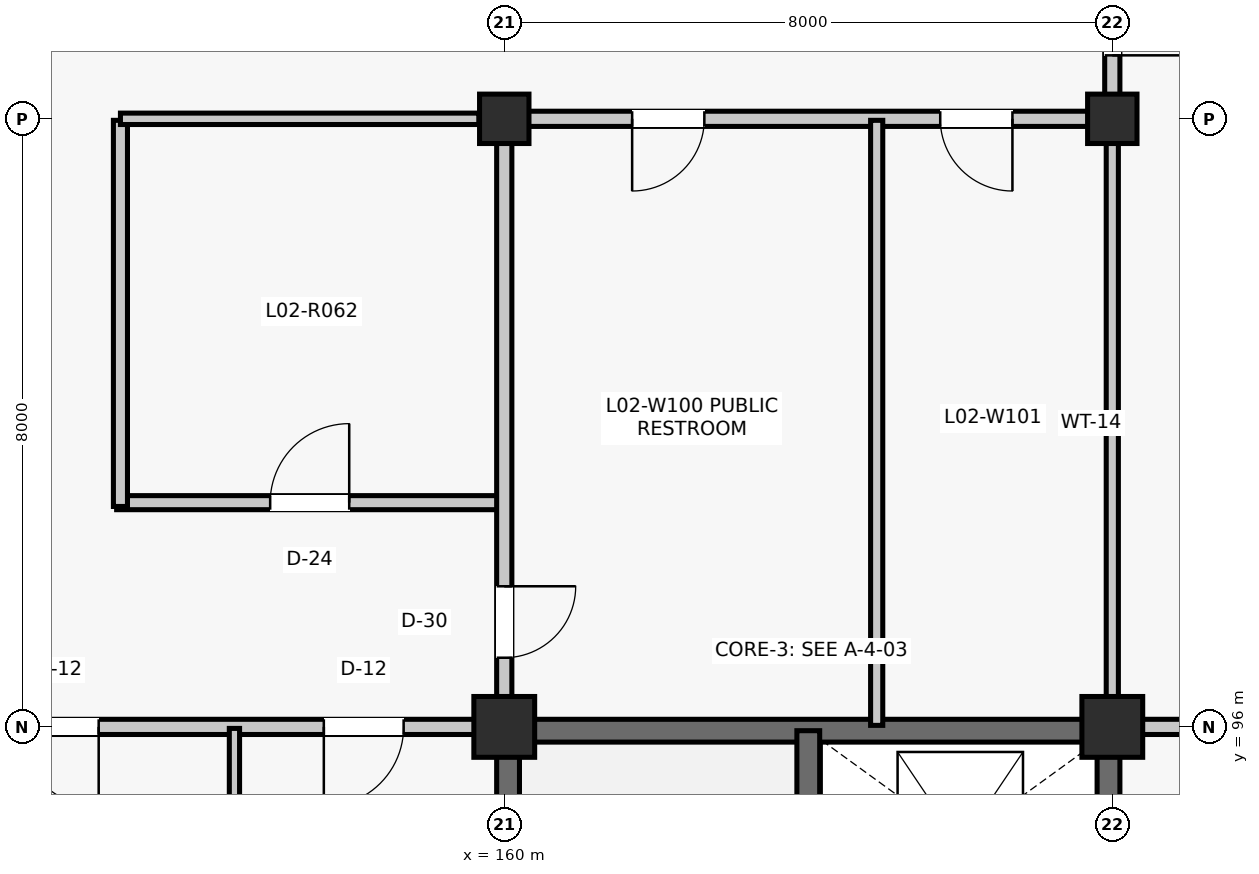
"""IFC4 building model, lengths in metres.
Left out: names, types, materials, properties, quantities, classifications, styles, units other than length and angle.
Written with IfcOpenShell. Run it as: python <this file> out.ifc"""

import sys

from ifc_helpers import new_model, si_unit, direction, frame, frame_2d, origin, origin_2d, place, context, subcontext, project, spatial, rectangle, extrude, element, fill, save


model = new_model("IFC4")
c1 = context("Model", 3, precision=1e-05, world=origin(), true_north=direction((0.0, 1.0)))
c2 = subcontext(c1, "Body", "Model", "MODEL_VIEW")
j1 = project(units=[si_unit("LENGTHUNIT", "METRE"), si_unit("PLANEANGLEUNIT", "RADIAN")], contexts=[c1])
p1 = place(None, origin())
s1 = spatial("IfcSite", under=j1, at=p1, CompositionType="ELEMENT")
p2 = place(p1, origin())
s2 = spatial("IfcBuilding", under=s1, at=p2, CompositionType="ELEMENT")
p3 = place(p2, frame((0.0, 0.0, 9.9)))
s3 = spatial("IfcBuildingStorey", under=s2, at=p3, CompositionType="ELEMENT", Elevation=9.9)
p4 = place(p3, frame((160.0, 96.0, 0.0), z_axis=(0.0, 0.0, 1.0), x_axis=(1.0, 0.0, 0.0)))
e1 = element("IfcColumn", 1, at=p4, inside=s3, PredefinedType="COLUMN", context=c2, shape_type="SweptSolid", body=[
    extrude(rectangle(XDim=0.8, YDim=0.8, at=origin_2d()), origin(), (0.0, 0.0, 1.0), 3.96),
])
p5 = place(p3, frame((160.0, 104.0, 0.0), z_axis=(0.0, 0.0, 1.0), x_axis=(1.0, 0.0, 0.0)))
e2 = element("IfcColumn", 2, at=p5, inside=s3, PredefinedType="COLUMN", context=c2, shape_type="SweptSolid", body=[
    extrude(rectangle(XDim=0.65, YDim=0.65, at=origin_2d()), origin(), (0.0, 0.0, 1.0), 3.96),
])
p6 = place(p3, frame((168.0, 96.0, 0.0), z_axis=(0.0, 0.0, 1.0), x_axis=(1.0, 0.0, 0.0)))
e3 = element("IfcColumn", 3, at=p6, inside=s3, PredefinedType="COLUMN", context=c2, shape_type="SweptSolid", body=[
    extrude(rectangle(XDim=0.8, YDim=0.8, at=origin_2d()), origin(), (0.0, 0.0, 1.0), 3.96),
])
p7 = place(p3, frame((168.0, 104.0, 0.0), z_axis=(0.0, 0.0, 1.0), x_axis=(1.0, 0.0, 0.0)))
e4 = element("IfcColumn", 4, at=p7, inside=s3, PredefinedType="COLUMN", context=c2, shape_type="SweptSolid", body=[
    extrude(rectangle(XDim=0.65, YDim=0.65, at=origin_2d()), origin(), (0.0, 0.0, 1.0), 3.96),
])
for number, where, z_axis, x_axis in (
    (5, (160.05, 88.29, 0.0), (0.0, 0.0, 1.0), (0.0, 1.0, 0.0)),
    (6, (160.29, 95.95, 0.0), (0.0, 0.0, 1.0), (1.0, 0.0, 0.0)),
):
    element("IfcWall", number, at=place(p3, frame(where, z_axis=z_axis, x_axis=x_axis)), inside=s3, PredefinedType="SHEAR", context=c2, shape_type="SweptSolid", body=[
        extrude(rectangle(XDim=7.42, YDim=0.3, at=frame_2d((3.71, 0.0))), origin(), (0.0, 0.0, 1.0), 3.705),
    ])
p8 = place(p3, frame((167.95, 88.29, 0.0), z_axis=(0.0, 0.0, 1.0), x_axis=(0.0, 1.0, 0.0)))
e7 = element("IfcWall", 7, at=p8, inside=s3, PredefinedType="SHEAR", context=c2, shape_type="SweptSolid", body=[
    extrude(rectangle(XDim=7.42, YDim=0.3, at=frame_2d((3.71, 0.0))), origin(), (0.0, 0.0, 1.0), 3.705),
])
p9 = place(p8, frame((1.6, 0.0, 0.0)))
e8 = element("IfcOpeningElement", 8, at=p9, cuts=e7, PredefinedType="OPENING", context=c2, shape_type="SweptSolid", body=[
    extrude(rectangle(XDim=1.2, YDim=2.15, at=frame_2d((0.6, 1.075))), frame((0.0, 0.16, 0.0), z_axis=(0.0, -1.0, 0.0), x_axis=(1.0, 0.0, 0.0)), (0.0, 0.0, 1.0), 0.32),
])
p10 = place(p3, frame((164.0, 88.05, 0.0), z_axis=(0.0, 0.0, 1.0), x_axis=(0.0, 1.0, 0.0)))
e9 = element("IfcWall", 9, at=p10, inside=s3, PredefinedType="SHEAR", context=c2, shape_type="SweptSolid", body=[
    extrude(rectangle(XDim=7.9, YDim=0.3, at=frame_2d((3.95, 0.0))), origin(), (0.0, 0.0, 1.0), 3.705),
])
p11 = place(p10, frame((0.55, 0.0, 0.0)))
e10 = element("IfcOpeningElement", 10, at=p11, cuts=e9, PredefinedType="OPENING", context=c2, shape_type="SweptSolid", body=[
    extrude(rectangle(XDim=1.1, YDim=2.15, at=frame_2d((0.55, 1.075))), frame((0.0, 0.16, 0.0), z_axis=(0.0, -1.0, 0.0), x_axis=(1.0, 0.0, 0.0)), (0.0, 0.0, 1.0), 0.32),
])
p12 = place(p3, frame((154.9, 98.95, 0.0), z_axis=(0.0, 0.0, 1.0), x_axis=(1.0, 0.0, 0.0)))
e11 = element("IfcWall", 11, at=p12, inside=s3, PredefinedType="PARTITIONING", context=c2, shape_type="SweptSolid", body=[
    extrude(rectangle(XDim=5.08, YDim=0.185, at=frame_2d((2.54, 0.0))), origin(), (0.0, 0.0, 1.0), 3.157),
])
p13 = place(p12, frame((2.02, 0.0, 0.0)))
e12 = element("IfcOpeningElement", 12, at=p13, cuts=e11, PredefinedType="OPENING", context=c2, shape_type="SweptSolid", body=[
    extrude(rectangle(XDim=1.04, YDim=2.18, at=frame_2d((0.52, 1.09))), frame((0.0, 0.103, 0.0), z_axis=(0.0, -1.0, 0.0), x_axis=(1.0, 0.0, 0.0)), (0.0, 0.0, 1.0), 0.205),
])
p14 = place(p3, frame((154.95, 98.9, 0.0), z_axis=(0.0, 0.0, 1.0), x_axis=(0.0, 1.0, 0.0)))
e13 = element("IfcWall", 13, at=p14, inside=s3, PredefinedType="PARTITIONING", context=c2, shape_type="SweptSolid", body=[
    extrude(rectangle(XDim=5.08, YDim=0.185, at=frame_2d((2.54, 0.0))), origin(), (0.0, 0.0, 1.0), 3.082),
])
p15 = place(p3, frame((154.95, 104.0, 0.0), z_axis=(0.0, 0.0, 1.0), x_axis=(1.0, 0.0, 0.0)))
e14 = element("IfcWall", 14, at=p15, inside=s3, PredefinedType="PARTITIONING", context=c2, shape_type="SweptSolid", body=[
    extrude(rectangle(XDim=4.715, YDim=0.15, at=frame_2d((2.357, 0.0))), origin(), (0.0, 0.0, 1.0), 3.082),
])
p16 = place(p3, frame((152.315, 96.0, 0.0), z_axis=(0.0, 0.0, 1.0), x_axis=(1.0, 0.0, 0.0)))
e15 = element("IfcWall", 15, at=p16, inside=s3, PredefinedType="PARTITIONING", context=c2, shape_type="SweptSolid", body=[
    extrude(rectangle(XDim=7.295, YDim=0.2, at=frame_2d((3.647, 0.0))), origin(), (0.0, 0.0, 1.0), 3.151),
])
p17 = place(p16, frame((1.299, 0.0, 0.0)))
e16 = element("IfcOpeningElement", 16, at=p17, cuts=e15, PredefinedType="OPENING", context=c2, shape_type="SweptSolid", body=[
    extrude(rectangle(XDim=1.05, YDim=2.15, at=frame_2d((0.525, 1.075))), frame((0.0, 0.11, 0.0), z_axis=(0.0, -1.0, 0.0), x_axis=(1.0, 0.0, 0.0)), (0.0, 0.0, 1.0), 0.22),
])
p18 = place(p16, frame((5.311, 0.0, 0.0)))
e17 = element("IfcOpeningElement", 17, at=p18, cuts=e15, PredefinedType="OPENING", context=c2, shape_type="SweptSolid", body=[
    extrude(rectangle(XDim=1.05, YDim=2.15, at=frame_2d((0.525, 1.075))), frame((0.0, 0.11, 0.0), z_axis=(0.0, -1.0, 0.0), x_axis=(1.0, 0.0, 0.0)), (0.0, 0.0, 1.0), 0.22),
])
p19 = place(p3, frame((160.0, 96.39, 0.0), z_axis=(0.0, 0.0, 1.0), x_axis=(0.0, 1.0, 0.0)))
e18 = element("IfcWall", 18, at=p19, inside=s3, PredefinedType="PARTITIONING", context=c2, shape_type="SweptSolid", body=[
    extrude(rectangle(XDim=7.295, YDim=0.2, at=frame_2d((3.647, 0.0))), origin(), (0.0, 0.0, 1.0), 3.157),
])
p20 = place(p19, frame((0.52, 0.0, 0.0)))
e19 = element("IfcOpeningElement", 19, at=p20, cuts=e18, PredefinedType="OPENING", context=c2, shape_type="SweptSolid", body=[
    extrude(rectangle(XDim=0.94, YDim=2.12, at=frame_2d((0.47, 1.06))), frame((0.0, 0.11, 0.0), z_axis=(0.0, -1.0, 0.0), x_axis=(1.0, 0.0, 0.0)), (0.0, 0.0, 1.0), 0.22),
])
p21 = place(p3, frame((168.0, 96.39, 0.0), z_axis=(0.0, 0.0, 1.0), x_axis=(0.0, 1.0, 0.0)))
e20 = element("IfcWall", 20, at=p21, inside=s3, PredefinedType="PARTITIONING", context=c2, shape_type="SweptSolid", body=[
    extrude(rectangle(XDim=7.295, YDim=0.16, at=frame_2d((3.647, 0.0))), origin(), (0.0, 0.0, 1.0), 3.227),
])
p22 = place(p3, frame((160.315, 104.0, 0.0), z_axis=(0.0, 0.0, 1.0), x_axis=(1.0, 0.0, 0.0)))
e21 = element("IfcWall", 21, at=p22, inside=s3, PredefinedType="PARTITIONING", context=c2, shape_type="SweptSolid", body=[
    extrude(rectangle(XDim=7.37, YDim=0.2, at=frame_2d((3.685, 0.0))), origin(), (0.0, 0.0, 1.0), 3.157),
])
p23 = place(p22, frame((1.367, 0.0, 0.0)))
e22 = element("IfcOpeningElement", 22, at=p23, cuts=e21, PredefinedType="OPENING", context=c2, shape_type="SweptSolid", body=[
    extrude(rectangle(XDim=0.95, YDim=2.1, at=frame_2d((0.475, 1.05))), frame((0.0, 0.11, 0.0), z_axis=(0.0, -1.0, 0.0), x_axis=(1.0, 0.0, 0.0)), (0.0, 0.0, 1.0), 0.22),
])
p24 = place(p22, frame((5.421, 0.0, 0.0)))
e23 = element("IfcOpeningElement", 23, at=p24, cuts=e21, PredefinedType="OPENING", context=c2, shape_type="SweptSolid", body=[
    extrude(rectangle(XDim=0.95, YDim=2.1, at=frame_2d((0.475, 1.05))), frame((0.0, 0.11, 0.0), z_axis=(0.0, -1.0, 0.0), x_axis=(1.0, 0.0, 0.0)), (0.0, 0.0, 1.0), 0.22),
])
p25 = place(p3, frame((168.0, 104.315, 0.0), z_axis=(0.0, 0.0, 1.0), x_axis=(0.0, 1.0, 0.0)))
e24 = element("IfcWall", 24, at=p25, inside=s3, PredefinedType="PARTITIONING", context=c2, shape_type="SweptSolid", body=[
    extrude(rectangle(XDim=7.37, YDim=0.2, at=frame_2d((3.685, 0.0))), origin(), (0.0, 0.0, 1.0), 3.151),
])
p26 = place(p25, frame((0.52, 0.0, 0.0)))
e25 = element("IfcOpeningElement", 25, at=p26, cuts=e24, PredefinedType="OPENING", context=c2, shape_type="SweptSolid", body=[
    extrude(rectangle(XDim=0.94, YDim=2.12, at=frame_2d((0.47, 1.06))), frame((0.0, 0.11, 0.0), z_axis=(0.0, -1.0, 0.0), x_axis=(1.0, 0.0, 0.0)), (0.0, 0.0, 1.0), 0.22),
])
p27 = place(p3, frame((168.39, 96.0, 0.0), z_axis=(0.0, 0.0, 1.0), x_axis=(1.0, 0.0, 0.0)))
e26 = element("IfcWall", 26, at=p27, inside=s3, PredefinedType="PARTITIONING", context=c2, shape_type="SweptSolid", body=[
    extrude(rectangle(XDim=7.295, YDim=0.2, at=frame_2d((3.647, 0.0))), origin(), (0.0, 0.0, 1.0), 3.157),
])
p28 = place(p27, frame((0.52, 0.0, 0.0)))
e27 = element("IfcOpeningElement", 27, at=p28, cuts=e26, PredefinedType="OPENING", context=c2, shape_type="SweptSolid", body=[
    extrude(rectangle(XDim=0.94, YDim=2.12, at=frame_2d((0.47, 1.06))), frame((0.0, 0.11, 0.0), z_axis=(0.0, -1.0, 0.0), x_axis=(1.0, 0.0, 0.0)), (0.0, 0.0, 1.0), 0.22),
])
p29 = place(p3, frame((156.45, 88.02, 0.0), z_axis=(0.0, 0.0, 1.0), x_axis=(0.0, 1.0, 0.0)))
e28 = element("IfcWall", 28, at=p29, inside=s3, PredefinedType="PARTITIONING", context=c2, shape_type="SweptSolid", body=[
    extrude(rectangle(XDim=7.96, YDim=0.135, at=frame_2d((3.98, 0.0))), origin(), (0.0, 0.0, 1.0), 3.151),
])
p30 = place(p29, frame((3.49, 0.0, 0.0)))
e29 = element("IfcOpeningElement", 29, at=p30, cuts=e28, PredefinedType="OPENING", context=c2, shape_type="SweptSolid", body=[
    extrude(rectangle(XDim=0.98, YDim=2.15, at=frame_2d((0.49, 1.075))), frame((0.0, 0.077, 0.0), z_axis=(0.0, -1.0, 0.0), x_axis=(1.0, 0.0, 0.0)), (0.0, 0.0, 1.0), 0.155),
])
p31 = place(p3, frame((164.9, 96.02, 0.0), z_axis=(0.0, 0.0, 1.0), x_axis=(0.0, 1.0, 0.0)))
e30 = element("IfcWall", 30, at=p31, inside=s3, PredefinedType="PARTITIONING", context=c2, shape_type="SweptSolid", body=[
    extrude(rectangle(XDim=7.96, YDim=0.16, at=frame_2d((3.98, 0.0))), origin(), (0.0, 0.0, 1.0), 3.082),
])
p32 = place(p13, origin())
e31 = element("IfcDoor", 31, at=p32, inside=s3, OperationType="SINGLE_SWING_RIGHT", PredefinedType="DOOR", context=c2, shape_type="SweptSolid", body=[
    extrude(rectangle(XDim=1.04, YDim=2.18, at=frame_2d((0.52, 1.09))), frame((0.0, 0.025, 0.0), z_axis=(0.0, -1.0, 0.0), x_axis=(1.0, 0.0, 0.0)), (0.0, 0.0, 1.0), 0.05),
])
fill(e12, e31)
p33 = place(p17, frame((1.05, 0.0, 0.0), z_axis=(0.0, 0.0, 1.0), x_axis=(-1.0, 0.0, 0.0)))
e32 = element("IfcDoor", 32, at=p33, inside=s3, OperationType="SINGLE_SWING_RIGHT", PredefinedType="DOOR", context=c2, shape_type="SweptSolid", body=[
    extrude(rectangle(XDim=1.05, YDim=2.15, at=frame_2d((0.525, 1.075))), frame((0.0, 0.025, 0.0), z_axis=(0.0, -1.0, 0.0), x_axis=(1.0, 0.0, 0.0)), (0.0, 0.0, 1.0), 0.05),
])
fill(e16, e32)
p34 = place(p18, frame((1.05, 0.0, 0.0), z_axis=(0.0, 0.0, 1.0), x_axis=(-1.0, 0.0, 0.0)))
e33 = element("IfcDoor", 33, at=p34, inside=s3, OperationType="SINGLE_SWING_LEFT", PredefinedType="DOOR", context=c2, shape_type="SweptSolid", body=[
    extrude(rectangle(XDim=1.05, YDim=2.15, at=frame_2d((0.525, 1.075))), frame((0.0, 0.025, 0.0), z_axis=(0.0, -1.0, 0.0), x_axis=(1.0, 0.0, 0.0)), (0.0, 0.0, 1.0), 0.05),
])
fill(e17, e33)
p35 = place(p20, frame((0.94, 0.0, 0.0), z_axis=(0.0, 0.0, 1.0), x_axis=(-1.0, 0.0, 0.0)))
e34 = element("IfcDoor", 34, at=p35, inside=s3, OperationType="SINGLE_SWING_RIGHT", PredefinedType="DOOR", context=c2, shape_type="SweptSolid", body=[
    extrude(rectangle(XDim=0.94, YDim=2.12, at=frame_2d((0.47, 1.06))), frame((0.0, 0.025, 0.0), z_axis=(0.0, -1.0, 0.0), x_axis=(1.0, 0.0, 0.0)), (0.0, 0.0, 1.0), 0.05),
])
fill(e19, e34)
p36 = place(p23, frame((0.95, 0.0, 0.0), z_axis=(0.0, 0.0, 1.0), x_axis=(-1.0, 0.0, 0.0)))
e35 = element("IfcDoor", 35, at=p36, inside=s3, OperationType="SINGLE_SWING_LEFT", PredefinedType="DOOR", context=c2, shape_type="SweptSolid", body=[
    extrude(rectangle(XDim=0.95, YDim=2.1, at=frame_2d((0.475, 1.05))), frame((0.0, 0.025, 0.0), z_axis=(0.0, -1.0, 0.0), x_axis=(1.0, 0.0, 0.0)), (0.0, 0.0, 1.0), 0.05),
])
fill(e22, e35)
p37 = place(p24, frame((0.95, 0.0, 0.0), z_axis=(0.0, 0.0, 1.0), x_axis=(-1.0, 0.0, 0.0)))
e36 = element("IfcDoor", 36, at=p37, inside=s3, OperationType="SINGLE_SWING_RIGHT", PredefinedType="DOOR", context=c2, shape_type="SweptSolid", body=[
    extrude(rectangle(XDim=0.95, YDim=2.1, at=frame_2d((0.475, 1.05))), frame((0.0, 0.025, 0.0), z_axis=(0.0, -1.0, 0.0), x_axis=(1.0, 0.0, 0.0)), (0.0, 0.0, 1.0), 0.05),
])
fill(e23, e36)
p38 = place(p26, frame((0.94, 0.0, 0.0), z_axis=(0.0, 0.0, 1.0), x_axis=(-1.0, 0.0, 0.0)))
e37 = element("IfcDoor", 37, at=p38, inside=s3, OperationType="SINGLE_SWING_LEFT", PredefinedType="DOOR", context=c2, shape_type="SweptSolid", body=[
    extrude(rectangle(XDim=0.94, YDim=2.12, at=frame_2d((0.47, 1.06))), frame((0.0, 0.025, 0.0), z_axis=(0.0, -1.0, 0.0), x_axis=(1.0, 0.0, 0.0)), (0.0, 0.0, 1.0), 0.05),
])
fill(e25, e37)
save(model, sys.argv[1])
